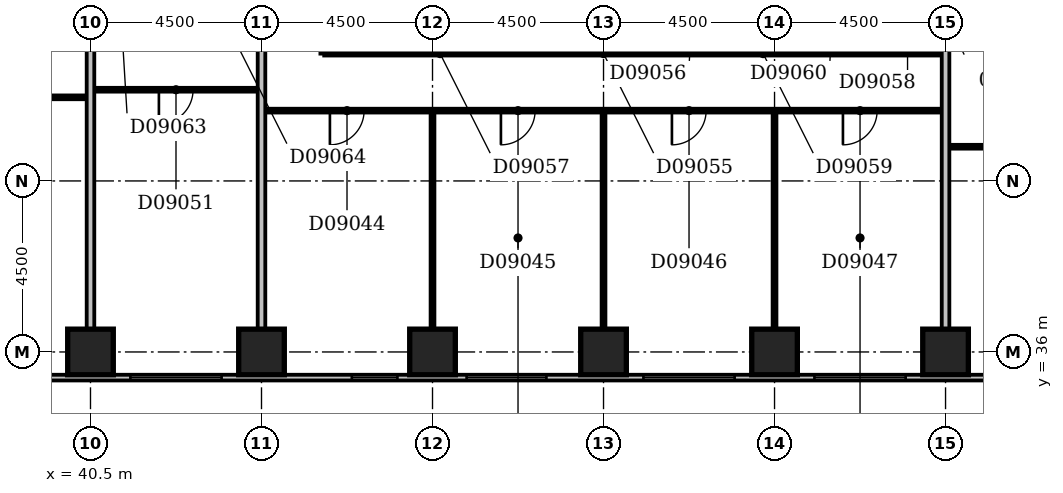
"""IFC4 building model, lengths in metres.
Left out: names, types, materials, properties, quantities, classifications, styles, units other than length and angle.
Written with IfcOpenShell. Run it as: python <this file> out.ifc"""

import sys

from ifc_helpers import new_model, si_unit, direction, frame, frame_2d, origin, origin_2d, place, context, subcontext, project, spatial, rectangle, extrude, element, fill, save


model = new_model("IFC4")
c1 = context("Model", 3, precision=1e-05, world=origin(), true_north=direction((0.0, 1.0)))
c2 = subcontext(c1, "Body", "Model", "MODEL_VIEW")
j1 = project(units=[si_unit("LENGTHUNIT", "METRE"), si_unit("PLANEANGLEUNIT", "RADIAN")], contexts=[c1])
p1 = place(None, origin())
s1 = spatial("IfcSite", under=j1, at=p1, CompositionType="ELEMENT")
p2 = place(p1, origin())
s2 = spatial("IfcBuilding", under=s1, at=p2, CompositionType="ELEMENT")
p3 = place(p2, frame((0.0, 0.0, 43.4)))
s3 = spatial("IfcBuildingStorey", under=s2, at=p3, CompositionType="ELEMENT", Elevation=43.4)
for number, where, z_axis, x_axis in (
    (1, (40.5, 36.0, -0.3), (0.0, 0.0, 1.0), (1.0, 0.0, 0.0)),
    (2, (45.0, 36.0, -0.3), (0.0, 0.0, 1.0), (1.0, 0.0, 0.0)),
    (3, (49.5, 36.0, -0.3), (0.0, 0.0, 1.0), (1.0, 0.0, 0.0)),
    (4, (54.0, 36.0, -0.3), (0.0, 0.0, 1.0), (1.0, 0.0, 0.0)),
    (5, (58.5, 36.0, -0.3), (0.0, 0.0, 1.0), (1.0, 0.0, 0.0)),
    (6, (63.0, 36.0, -0.3), (0.0, 0.0, 1.0), (1.0, 0.0, 0.0)),
):
    element("IfcColumn", number, at=place(p3, frame(where, z_axis=z_axis, x_axis=x_axis)), inside=s3, PredefinedType="COLUMN", context=c2, shape_type="SweptSolid", body=[
        extrude(rectangle(XDim=1.2, YDim=1.2, at=origin_2d()), origin(), (0.0, 0.0, 1.0), 3.6),
    ])
p4 = place(p3, frame((23.1, 35.325, 0.0), z_axis=(0.0, 0.0, 1.0), x_axis=(1.0, 0.0, 0.0)))
e7 = element("IfcWall", 7, at=p4, inside=s3, PredefinedType="STANDARD", context=c2, shape_type="SweptSolid", body=[
    extrude(rectangle(XDim=45.15, YDim=0.15, at=frame_2d((22.575, 0.0))), origin(), (0.0, 0.0, 1.0), 2.7),
])
p5 = place(p4, frame((0.303, 0.0, 0.6)))
e8 = element("IfcOpeningElement", 8, at=p5, cuts=e7, PredefinedType="OPENING", context=c2, shape_type="SweptSolid", body=[
    extrude(rectangle(XDim=2.1, YDim=1.8, at=frame_2d((1.05, 0.9))), frame((0.0, 0.087, 0.0), z_axis=(0.0, -1.0, 0.0), x_axis=(1.0, 0.0, 0.0)), (0.0, 0.0, 1.0), 0.174),
])
p6 = place(p4, frame((4.95, 0.0, 0.6)))
e9 = element("IfcOpeningElement", 9, at=p6, cuts=e7, PredefinedType="OPENING", context=c2, shape_type="SweptSolid", body=[
    extrude(rectangle(XDim=2.4, YDim=1.8, at=frame_2d((1.2, 0.9))), frame((0.0, 0.087, 0.0), z_axis=(0.0, -1.0, 0.0), x_axis=(1.0, 0.0, 0.0)), (0.0, 0.0, 1.0), 0.174),
])
p7 = place(p4, frame((9.45, 0.0, 0.6)))
e10 = element("IfcOpeningElement", 10, at=p7, cuts=e7, PredefinedType="OPENING", context=c2, shape_type="SweptSolid", body=[
    extrude(rectangle(XDim=2.4, YDim=1.8, at=frame_2d((1.2, 0.9))), frame((0.0, 0.087, 0.0), z_axis=(0.0, -1.0, 0.0), x_axis=(1.0, 0.0, 0.0)), (0.0, 0.0, 1.0), 0.174),
])
p8 = place(p4, frame((13.95, 0.0, 0.6)))
e11 = element("IfcOpeningElement", 11, at=p8, cuts=e7, PredefinedType="OPENING", context=c2, shape_type="SweptSolid", body=[
    extrude(rectangle(XDim=2.4, YDim=1.8, at=frame_2d((1.2, 0.9))), frame((0.0, 0.087, 0.0), z_axis=(0.0, -1.0, 0.0), x_axis=(1.0, 0.0, 0.0)), (0.0, 0.0, 1.0), 0.174),
])
p9 = place(p4, frame((18.45, 0.0, 0.6)))
e12 = element("IfcOpeningElement", 12, at=p9, cuts=e7, PredefinedType="OPENING", context=c2, shape_type="SweptSolid", body=[
    extrude(rectangle(XDim=2.4, YDim=1.8, at=frame_2d((1.2, 0.9))), frame((0.0, 0.087, 0.0), z_axis=(0.0, -1.0, 0.0), x_axis=(1.0, 0.0, 0.0)), (0.0, 0.0, 1.0), 0.174),
])
p10 = place(p4, frame((24.277, 0.0, 0.6)))
e13 = element("IfcOpeningElement", 13, at=p10, cuts=e7, PredefinedType="OPENING", context=c2, shape_type="SweptSolid", body=[
    extrude(rectangle(XDim=1.2, YDim=1.8, at=frame_2d((0.6, 0.9))), frame((0.0, 0.087, 0.0), z_axis=(0.0, -1.0, 0.0), x_axis=(1.0, 0.0, 0.0)), (0.0, 0.0, 1.0), 0.174),
])
p11 = place(p4, frame((27.297, 0.0, 0.6)))
e14 = element("IfcOpeningElement", 14, at=p11, cuts=e7, PredefinedType="OPENING", context=c2, shape_type="SweptSolid", body=[
    extrude(rectangle(XDim=2.1, YDim=1.8, at=frame_2d((1.05, 0.9))), frame((0.0, 0.087, 0.0), z_axis=(0.0, -1.0, 0.0), x_axis=(1.0, 0.0, 0.0)), (0.0, 0.0, 1.0), 0.174),
])
p12 = place(p4, frame((31.95, 0.0, 0.6)))
e15 = element("IfcOpeningElement", 15, at=p12, cuts=e7, PredefinedType="OPENING", context=c2, shape_type="SweptSolid", body=[
    extrude(rectangle(XDim=2.4, YDim=1.8, at=frame_2d((1.2, 0.9))), frame((0.0, 0.087, 0.0), z_axis=(0.0, -1.0, 0.0), x_axis=(1.0, 0.0, 0.0)), (0.0, 0.0, 1.0), 0.174),
])
p13 = place(p4, frame((36.45, 0.0, 0.6)))
e16 = element("IfcOpeningElement", 16, at=p13, cuts=e7, PredefinedType="OPENING", context=c2, shape_type="SweptSolid", body=[
    extrude(rectangle(XDim=2.4, YDim=1.8, at=frame_2d((1.2, 0.9))), frame((0.0, 0.087, 0.0), z_axis=(0.0, -1.0, 0.0), x_axis=(1.0, 0.0, 0.0)), (0.0, 0.0, 1.0), 0.174),
])
p14 = place(p4, frame((40.95, 0.0, 0.6)))
e17 = element("IfcOpeningElement", 17, at=p14, cuts=e7, PredefinedType="OPENING", context=c2, shape_type="SweptSolid", body=[
    extrude(rectangle(XDim=2.4, YDim=1.8, at=frame_2d((1.2, 0.9))), frame((0.0, 0.087, 0.0), z_axis=(0.0, -1.0, 0.0), x_axis=(1.0, 0.0, 0.0)), (0.0, 0.0, 1.0), 0.174),
])
p15 = place(p3, frame((40.5, 36.6, 0.0), z_axis=(0.0, 0.0, 1.0), x_axis=(0.0, 1.0, 0.0)))
e18 = element("IfcWall", 18, at=p15, inside=s3, PredefinedType="PARTITIONING", context=c2, shape_type="SweptSolid", body=[
    extrude(rectangle(XDim=12.8, YDim=0.2, at=frame_2d((6.4, 0.0))), origin(), (0.0, 0.0, 1.0), 3.3),
])
p16 = place(p3, frame((45.0, 36.6, 0.0), z_axis=(0.0, 0.0, 1.0), x_axis=(0.0, 1.0, 0.0)))
e19 = element("IfcWall", 19, at=p16, inside=s3, PredefinedType="PARTITIONING", context=c2, shape_type="SweptSolid", body=[
    extrude(rectangle(XDim=12.8, YDim=0.2, at=frame_2d((6.4, 0.0))), origin(), (0.0, 0.0, 1.0), 2.6),
])
p17 = place(p3, frame((49.5, 36.6, 0.0), z_axis=(0.0, 0.0, 1.0), x_axis=(0.0, 1.0, 0.0)))
e20 = element("IfcWall", 20, at=p17, inside=s3, PredefinedType="PARTITIONING", context=c2, shape_type="SweptSolid", body=[
    extrude(rectangle(XDim=5.7, YDim=0.1, at=frame_2d((2.85, 0.0))), origin(), (0.0, 0.0, 1.0), 3.3),
])
p18 = place(p3, frame((54.0, 36.6, 0.0), z_axis=(0.0, 0.0, 1.0), x_axis=(0.0, 1.0, 0.0)))
e21 = element("IfcWall", 21, at=p18, inside=s3, PredefinedType="PARTITIONING", context=c2, shape_type="SweptSolid", body=[
    extrude(rectangle(XDim=5.7, YDim=0.1, at=frame_2d((2.85, 0.0))), origin(), (0.0, 0.0, 1.0), 2.6),
])
p19 = place(p3, frame((58.5, 36.6, 0.0), z_axis=(0.0, 0.0, 1.0), x_axis=(0.0, 1.0, 0.0)))
e22 = element("IfcWall", 22, at=p19, inside=s3, PredefinedType="PARTITIONING", context=c2, shape_type="SweptSolid", body=[
    extrude(rectangle(XDim=5.7, YDim=0.1, at=frame_2d((2.85, 0.0))), origin(), (0.0, 0.0, 1.0), 3.3),
])
p20 = place(p3, frame((63.0, 36.6, 0.0), z_axis=(0.0, 0.0, 1.0), x_axis=(0.0, 1.0, 0.0)))
e23 = element("IfcWall", 23, at=p20, inside=s3, PredefinedType="PARTITIONING", context=c2, shape_type="SweptSolid", body=[
    extrude(rectangle(XDim=12.8, YDim=0.2, at=frame_2d((6.4, 0.0))), origin(), (0.0, 0.0, 1.0), 2.4),
])
p21 = place(p3, frame((63.1, 41.4, 0.0), z_axis=(0.0, 0.0, 1.0), x_axis=(1.0, 0.0, 0.0)))
e24 = element("IfcWall", 24, at=p21, inside=s3, PredefinedType="PARTITIONING", context=c2, shape_type="SweptSolid", body=[
    extrude(rectangle(XDim=5.0, YDim=0.1, at=frame_2d((2.5, 0.0))), origin(), (0.0, 0.0, 1.0), 3.3),
])
p22 = place(p21, frame((1.7, 0.0, 0.0)))
e25 = element("IfcOpeningElement", 25, at=p22, cuts=e24, PredefinedType="OPENING", context=c2, shape_type="SweptSolid", body=[
    extrude(rectangle(XDim=0.9, YDim=2.1, at=frame_2d((0.45, 1.05))), frame((0.0, 0.062, 0.0), z_axis=(0.0, -1.0, 0.0), x_axis=(1.0, 0.0, 0.0)), (0.0, 0.0, 1.0), 0.124),
])
p23 = place(p3, frame((45.1, 42.35, 0.0), z_axis=(0.0, 0.0, 1.0), x_axis=(1.0, 0.0, 0.0)))
e26 = element("IfcWall", 26, at=p23, inside=s3, PredefinedType="PARTITIONING", context=c2, shape_type="SweptSolid", body=[
    extrude(rectangle(XDim=17.8, YDim=0.1, at=frame_2d((8.9, 0.0))), origin(), (0.0, 0.0, 1.0), 3.3),
])
p24 = place(p23, frame((1.7, 0.0, 0.0)))
e27 = element("IfcOpeningElement", 27, at=p24, cuts=e26, PredefinedType="OPENING", context=c2, shape_type="SweptSolid", body=[
    extrude(rectangle(XDim=0.9, YDim=2.1, at=frame_2d((0.45, 1.05))), frame((0.0, 0.062, 0.0), z_axis=(0.0, -1.0, 0.0), x_axis=(1.0, 0.0, 0.0)), (0.0, 0.0, 1.0), 0.124),
])
p25 = place(p23, frame((6.2, 0.0, 0.0)))
e28 = element("IfcOpeningElement", 28, at=p25, cuts=e26, PredefinedType="OPENING", context=c2, shape_type="SweptSolid", body=[
    extrude(rectangle(XDim=0.9, YDim=2.1, at=frame_2d((0.45, 1.05))), frame((0.0, 0.062, 0.0), z_axis=(0.0, -1.0, 0.0), x_axis=(1.0, 0.0, 0.0)), (0.0, 0.0, 1.0), 0.124),
])
p26 = place(p23, frame((10.7, 0.0, 0.0)))
e29 = element("IfcOpeningElement", 29, at=p26, cuts=e26, PredefinedType="OPENING", context=c2, shape_type="SweptSolid", body=[
    extrude(rectangle(XDim=0.9, YDim=2.1, at=frame_2d((0.45, 1.05))), frame((0.0, 0.062, 0.0), z_axis=(0.0, -1.0, 0.0), x_axis=(1.0, 0.0, 0.0)), (0.0, 0.0, 1.0), 0.124),
])
p27 = place(p23, frame((15.2, 0.0, 0.0)))
e30 = element("IfcOpeningElement", 30, at=p27, cuts=e26, PredefinedType="OPENING", context=c2, shape_type="SweptSolid", body=[
    extrude(rectangle(XDim=0.9, YDim=2.1, at=frame_2d((0.45, 1.05))), frame((0.0, 0.062, 0.0), z_axis=(0.0, -1.0, 0.0), x_axis=(1.0, 0.0, 0.0)), (0.0, 0.0, 1.0), 0.124),
])
p28 = place(p3, frame((31.6, 42.7, 0.0), z_axis=(0.0, 0.0, 1.0), x_axis=(1.0, 0.0, 0.0)))
e31 = element("IfcWall", 31, at=p28, inside=s3, PredefinedType="PARTITIONING", context=c2, shape_type="SweptSolid", body=[
    extrude(rectangle(XDim=8.8, YDim=0.1, at=frame_2d((4.4, 0.0))), origin(), (0.0, 0.0, 1.0), 3.3),
])
p29 = place(p28, frame((1.7, 0.0, 0.0)))
e32 = element("IfcOpeningElement", 32, at=p29, cuts=e31, PredefinedType="OPENING", context=c2, shape_type="SweptSolid", body=[
    extrude(rectangle(XDim=0.9, YDim=2.1, at=frame_2d((0.45, 1.05))), frame((0.0, 0.062, 0.0), z_axis=(0.0, -1.0, 0.0), x_axis=(1.0, 0.0, 0.0)), (0.0, 0.0, 1.0), 0.124),
])
p30 = place(p28, frame((6.2, 0.0, 0.0)))
e33 = element("IfcOpeningElement", 33, at=p30, cuts=e31, PredefinedType="OPENING", context=c2, shape_type="SweptSolid", body=[
    extrude(rectangle(XDim=0.9, YDim=2.1, at=frame_2d((0.45, 1.05))), frame((0.0, 0.062, 0.0), z_axis=(0.0, -1.0, 0.0), x_axis=(1.0, 0.0, 0.0)), (0.0, 0.0, 1.0), 0.124),
])
p31 = place(p3, frame((40.6, 42.9, 0.0), z_axis=(0.0, 0.0, 1.0), x_axis=(1.0, 0.0, 0.0)))
e34 = element("IfcWall", 34, at=p31, inside=s3, PredefinedType="PARTITIONING", context=c2, shape_type="SweptSolid", body=[
    extrude(rectangle(XDim=4.3, YDim=0.1, at=frame_2d((2.15, 0.0))), origin(), (0.0, 0.0, 1.0), 3.3),
])
p32 = place(p31, frame((1.7, 0.0, 0.0)))
e35 = element("IfcOpeningElement", 35, at=p32, cuts=e34, PredefinedType="OPENING", context=c2, shape_type="SweptSolid", body=[
    extrude(rectangle(XDim=0.9, YDim=2.1, at=frame_2d((0.45, 1.05))), frame((0.0, 0.062, 0.0), z_axis=(0.0, -1.0, 0.0), x_axis=(1.0, 0.0, 0.0)), (0.0, 0.0, 1.0), 0.124),
])
p33 = place(p3, frame((46.6, 43.85, 0.0), z_axis=(0.0, 0.0, 1.0), x_axis=(0.0, 1.0, 0.0)))
e36 = element("IfcWall", 36, at=p33, inside=s3, PredefinedType="PARTITIONING", context=c2, shape_type="SweptSolid", body=[
    extrude(rectangle(XDim=5.55, YDim=0.1, at=frame_2d((2.775, 0.0))), origin(), (0.0, 0.0, 1.0), 3.3),
])
p34 = place(p3, frame((46.65, 43.85, 0.0), z_axis=(0.0, 0.0, 1.0), x_axis=(1.0, 0.0, 0.0)))
e37 = element("IfcWall", 37, at=p34, inside=s3, PredefinedType="PARTITIONING", context=c2, shape_type="SweptSolid", body=[
    extrude(rectangle(XDim=16.25, YDim=0.1, at=frame_2d((8.125, 0.0))), origin(), (0.0, 0.0, 1.0), 3.3),
])
p35 = place(p34, frame((6.95, 0.0, 0.0)))
e38 = element("IfcOpeningElement", 38, at=p35, cuts=e37, PredefinedType="OPENING", context=c2, shape_type="SweptSolid", body=[
    extrude(rectangle(XDim=0.8, YDim=2.1, at=frame_2d((0.4, 1.05))), frame((0.0, 0.062, 0.0), z_axis=(0.0, -1.0, 0.0), x_axis=(1.0, 0.0, 0.0)), (0.0, 0.0, 1.0), 0.124),
])
p36 = place(p34, frame((9.25, 0.0, 0.0)))
e39 = element("IfcOpeningElement", 39, at=p36, cuts=e37, PredefinedType="OPENING", context=c2, shape_type="SweptSolid", body=[
    extrude(rectangle(XDim=0.8, YDim=2.1, at=frame_2d((0.4, 1.05))), frame((0.0, 0.062, 0.0), z_axis=(0.0, -1.0, 0.0), x_axis=(1.0, 0.0, 0.0)), (0.0, 0.0, 1.0), 0.124),
])
p37 = place(p34, frame((2.6, 0.0, 0.0)))
e40 = element("IfcOpeningElement", 40, at=p37, cuts=e37, PredefinedType="OPENING", context=c2, shape_type="SweptSolid", body=[
    extrude(rectangle(XDim=0.9, YDim=2.1, at=frame_2d((0.45, 1.05))), frame((0.0, 0.062, 0.0), z_axis=(0.0, -1.0, 0.0), x_axis=(1.0, 0.0, 0.0)), (0.0, 0.0, 1.0), 0.124),
])
p38 = place(p34, frame((14.95, 0.0, 0.0)))
e41 = element("IfcOpeningElement", 41, at=p38, cuts=e37, PredefinedType="OPENING", context=c2, shape_type="SweptSolid", body=[
    extrude(rectangle(XDim=0.8, YDim=2.1, at=frame_2d((0.4, 1.05))), frame((0.0, 0.062, 0.0), z_axis=(0.0, -1.0, 0.0), x_axis=(1.0, 0.0, 0.0)), (0.0, 0.0, 1.0), 0.124),
])
p39 = place(p34, frame((11.15, 0.0, 0.0)))
e42 = element("IfcOpeningElement", 42, at=p39, cuts=e37, PredefinedType="OPENING", context=c2, shape_type="SweptSolid", body=[
    extrude(rectangle(XDim=0.8, YDim=2.1, at=frame_2d((0.4, 1.05))), frame((0.0, 0.062, 0.0), z_axis=(0.0, -1.0, 0.0), x_axis=(1.0, 0.0, 0.0)), (0.0, 0.0, 1.0), 0.124),
])
p40 = place(p34, frame((12.95, 0.0, 0.0)))
e43 = element("IfcOpeningElement", 43, at=p40, cuts=e37, PredefinedType="OPENING", context=c2, shape_type="SweptSolid", body=[
    extrude(rectangle(XDim=0.8, YDim=2.1, at=frame_2d((0.4, 1.05))), frame((0.0, 0.062, 0.0), z_axis=(0.0, -1.0, 0.0), x_axis=(1.0, 0.0, 0.0)), (0.0, 0.0, 1.0), 0.124),
])
p41 = place(p9, origin())
e44 = element("IfcWindow", 44, at=p41, inside=s3, PartitioningType="SINGLE_PANEL", PredefinedType="WINDOW", context=c2, shape_type="SweptSolid", body=[
    extrude(rectangle(XDim=2.4, YDim=1.8, at=frame_2d((1.2, 0.9))), frame((0.0, 0.03, 0.0), z_axis=(0.0, -1.0, 0.0), x_axis=(1.0, 0.0, 0.0)), (0.0, 0.0, 1.0), 0.06),
])
fill(e12, e44)
p42 = place(p10, origin())
e45 = element("IfcWindow", 45, at=p42, inside=s3, PartitioningType="SINGLE_PANEL", PredefinedType="WINDOW", context=c2, shape_type="SweptSolid", body=[
    extrude(rectangle(XDim=1.2, YDim=1.8, at=frame_2d((0.6, 0.9))), frame((0.0, 0.03, 0.0), z_axis=(0.0, -1.0, 0.0), x_axis=(1.0, 0.0, 0.0)), (0.0, 0.0, 1.0), 0.06),
])
fill(e13, e45)
p43 = place(p11, origin())
e46 = element("IfcWindow", 46, at=p43, inside=s3, PartitioningType="SINGLE_PANEL", PredefinedType="WINDOW", context=c2, shape_type="SweptSolid", body=[
    extrude(rectangle(XDim=2.1, YDim=1.8, at=frame_2d((1.05, 0.9))), frame((0.0, 0.03, 0.0), z_axis=(0.0, -1.0, 0.0), x_axis=(1.0, 0.0, 0.0)), (0.0, 0.0, 1.0), 0.06),
])
fill(e14, e46)
p44 = place(p12, origin())
e47 = element("IfcWindow", 47, at=p44, inside=s3, PartitioningType="SINGLE_PANEL", PredefinedType="WINDOW", context=c2, shape_type="SweptSolid", body=[
    extrude(rectangle(XDim=2.4, YDim=1.8, at=frame_2d((1.2, 0.9))), frame((0.0, 0.03, 0.0), z_axis=(0.0, -1.0, 0.0), x_axis=(1.0, 0.0, 0.0)), (0.0, 0.0, 1.0), 0.06),
])
fill(e15, e47)
p45 = place(p13, origin())
e48 = element("IfcWindow", 48, at=p45, inside=s3, PartitioningType="SINGLE_PANEL", PredefinedType="WINDOW", context=c2, shape_type="SweptSolid", body=[
    extrude(rectangle(XDim=2.4, YDim=1.8, at=frame_2d((1.2, 0.9))), frame((0.0, 0.03, 0.0), z_axis=(0.0, -1.0, 0.0), x_axis=(1.0, 0.0, 0.0)), (0.0, 0.0, 1.0), 0.06),
])
fill(e16, e48)
p46 = place(p24, frame((0.9, 0.0, 0.0), z_axis=(0.0, 0.0, 1.0), x_axis=(-1.0, 0.0, 0.0)))
e49 = element("IfcDoor", 49, at=p46, inside=s3, OperationType="SINGLE_SWING_RIGHT", PredefinedType="DOOR", context=c2, shape_type="SweptSolid", body=[
    extrude(rectangle(XDim=0.9, YDim=2.1, at=frame_2d((0.45, 1.05))), frame((0.0, 0.025, 0.0), z_axis=(0.0, -1.0, 0.0), x_axis=(1.0, 0.0, 0.0)), (0.0, 0.0, 1.0), 0.05),
])
fill(e27, e49)
p47 = place(p25, frame((0.9, 0.0, 0.0), z_axis=(0.0, 0.0, 1.0), x_axis=(-1.0, 0.0, 0.0)))
e50 = element("IfcDoor", 50, at=p47, inside=s3, OperationType="SINGLE_SWING_RIGHT", PredefinedType="DOOR", context=c2, shape_type="SweptSolid", body=[
    extrude(rectangle(XDim=0.9, YDim=2.1, at=frame_2d((0.45, 1.05))), frame((0.0, 0.025, 0.0), z_axis=(0.0, -1.0, 0.0), x_axis=(1.0, 0.0, 0.0)), (0.0, 0.0, 1.0), 0.05),
])
fill(e28, e50)
p48 = place(p26, frame((0.9, 0.0, 0.0), z_axis=(0.0, 0.0, 1.0), x_axis=(-1.0, 0.0, 0.0)))
e51 = element("IfcDoor", 51, at=p48, inside=s3, OperationType="SINGLE_SWING_RIGHT", PredefinedType="DOOR", context=c2, shape_type="SweptSolid", body=[
    extrude(rectangle(XDim=0.9, YDim=2.1, at=frame_2d((0.45, 1.05))), frame((0.0, 0.025, 0.0), z_axis=(0.0, -1.0, 0.0), x_axis=(1.0, 0.0, 0.0)), (0.0, 0.0, 1.0), 0.05),
])
fill(e29, e51)
p49 = place(p27, frame((0.9, 0.0, 0.0), z_axis=(0.0, 0.0, 1.0), x_axis=(-1.0, 0.0, 0.0)))
e52 = element("IfcDoor", 52, at=p49, inside=s3, OperationType="SINGLE_SWING_RIGHT", PredefinedType="DOOR", context=c2, shape_type="SweptSolid", body=[
    extrude(rectangle(XDim=0.9, YDim=2.1, at=frame_2d((0.45, 1.05))), frame((0.0, 0.025, 0.0), z_axis=(0.0, -1.0, 0.0), x_axis=(1.0, 0.0, 0.0)), (0.0, 0.0, 1.0), 0.05),
])
fill(e30, e52)
p50 = place(p32, frame((0.9, 0.0, 0.0), z_axis=(0.0, 0.0, 1.0), x_axis=(-1.0, 0.0, 0.0)))
e53 = element("IfcDoor", 53, at=p50, inside=s3, OperationType="SINGLE_SWING_RIGHT", PredefinedType="DOOR", context=c2, shape_type="SweptSolid", body=[
    extrude(rectangle(XDim=0.9, YDim=2.1, at=frame_2d((0.45, 1.05))), frame((0.0, 0.025, 0.0), z_axis=(0.0, -1.0, 0.0), x_axis=(1.0, 0.0, 0.0)), (0.0, 0.0, 1.0), 0.05),
])
fill(e35, e53)
p51 = place(p35, origin())
e54 = element("IfcDoor", 54, at=p51, inside=s3, OperationType="SINGLE_SWING_LEFT", PredefinedType="DOOR", context=c2, shape_type="SweptSolid", body=[
    extrude(rectangle(XDim=0.8, YDim=2.1, at=frame_2d((0.4, 1.05))), frame((0.0, 0.025, 0.0), z_axis=(0.0, -1.0, 0.0), x_axis=(1.0, 0.0, 0.0)), (0.0, 0.0, 1.0), 0.05),
])
fill(e38, e54)
p52 = place(p36, origin())
e55 = element("IfcDoor", 55, at=p52, inside=s3, OperationType="SINGLE_SWING_LEFT", PredefinedType="DOOR", context=c2, shape_type="SweptSolid", body=[
    extrude(rectangle(XDim=0.8, YDim=2.1, at=frame_2d((0.4, 1.05))), frame((0.0, 0.025, 0.0), z_axis=(0.0, -1.0, 0.0), x_axis=(1.0, 0.0, 0.0)), (0.0, 0.0, 1.0), 0.05),
])
fill(e39, e55)
p53 = place(p37, origin())
e56 = element("IfcDoor", 56, at=p53, inside=s3, OperationType="SINGLE_SWING_LEFT", PredefinedType="DOOR", context=c2, shape_type="SweptSolid", body=[
    extrude(rectangle(XDim=0.9, YDim=2.1, at=frame_2d((0.45, 1.05))), frame((0.0, 0.025, 0.0), z_axis=(0.0, -1.0, 0.0), x_axis=(1.0, 0.0, 0.0)), (0.0, 0.0, 1.0), 0.05),
])
fill(e40, e56)
p54 = place(p38, origin())
e57 = element("IfcDoor", 57, at=p54, inside=s3, OperationType="SINGLE_SWING_LEFT", PredefinedType="DOOR", context=c2, shape_type="SweptSolid", body=[
    extrude(rectangle(XDim=0.8, YDim=2.1, at=frame_2d((0.4, 1.05))), frame((0.0, 0.025, 0.0), z_axis=(0.0, -1.0, 0.0), x_axis=(1.0, 0.0, 0.0)), (0.0, 0.0, 1.0), 0.05),
])
fill(e41, e57)
p55 = place(p39, origin())
e58 = element("IfcDoor", 58, at=p55, inside=s3, OperationType="SINGLE_SWING_LEFT", PredefinedType="DOOR", context=c2, shape_type="SweptSolid", body=[
    extrude(rectangle(XDim=0.8, YDim=2.1, at=frame_2d((0.4, 1.05))), frame((0.0, 0.025, 0.0), z_axis=(0.0, -1.0, 0.0), x_axis=(1.0, 0.0, 0.0)), (0.0, 0.0, 1.0), 0.05),
])
fill(e42, e58)
p56 = place(p40, origin())
e59 = element("IfcDoor", 59, at=p56, inside=s3, OperationType="SINGLE_SWING_LEFT", PredefinedType="DOOR", context=c2, shape_type="SweptSolid", body=[
    extrude(rectangle(XDim=0.8, YDim=2.1, at=frame_2d((0.4, 1.05))), frame((0.0, 0.025, 0.0), z_axis=(0.0, -1.0, 0.0), x_axis=(1.0, 0.0, 0.0)), (0.0, 0.0, 1.0), 0.05),
])
fill(e43, e59)
save(model, sys.argv[1])
